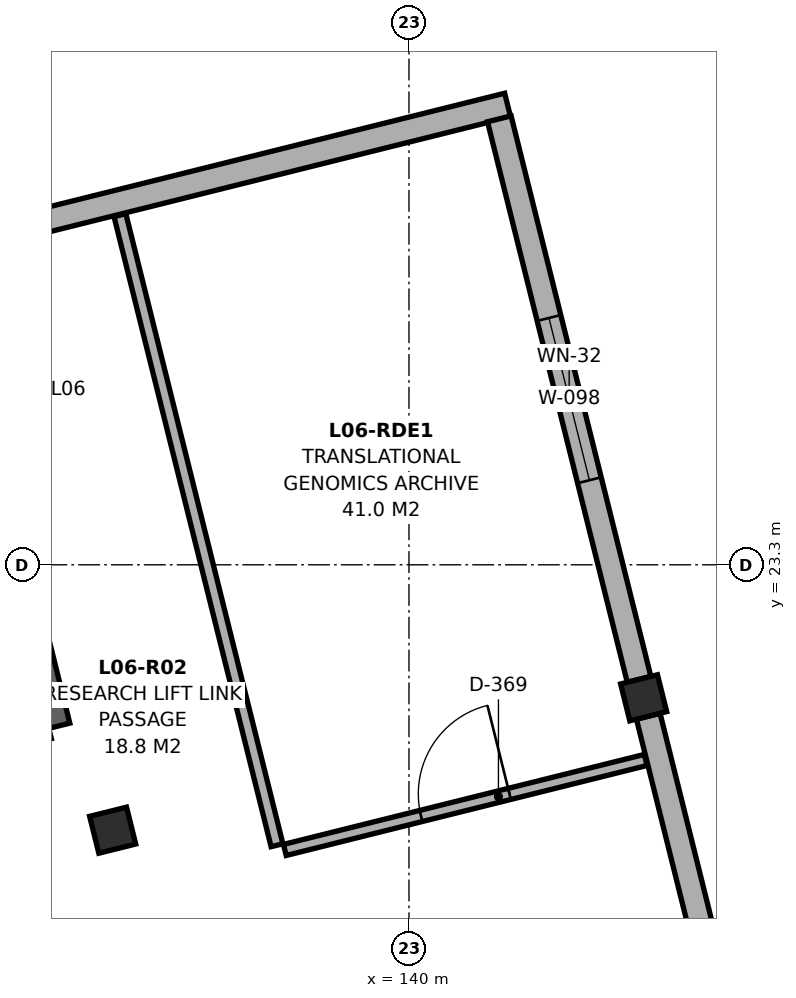
"""IFC4 building model, lengths in metres.
Left out: names, types, materials, properties, quantities, classifications, styles, units other than length and angle.
Written with IfcOpenShell. Run it as: python <this file> out.ifc"""

import sys

from ifc_helpers import new_model, si_unit, direction, frame, frame_2d, origin, origin_2d, place, context, subcontext, project, spatial, rectangle, extrude, element, fill, save


model = new_model("IFC4")
c1 = context("Model", 3, precision=1e-05, world=origin(), true_north=direction((0.0, 1.0)))
c2 = subcontext(c1, "Body", "Model", "MODEL_VIEW")
j1 = project(units=[si_unit("LENGTHUNIT", "METRE"), si_unit("PLANEANGLEUNIT", "RADIAN")], contexts=[c1])
p1 = place(None, origin())
s1 = spatial("IfcSite", under=j1, at=p1, CompositionType="ELEMENT")
p2 = place(p1, origin())
s2 = spatial("IfcBuilding", under=s1, at=p2, CompositionType="ELEMENT")
p3 = place(p2, frame((0.0, 0.0, 25.5)))
s3 = spatial("IfcBuildingStorey", under=s2, at=p3, CompositionType="ELEMENT", Elevation=25.5)
p4 = place(p3, frame((136.102, 19.808, 0.0), z_axis=(0.0, 0.0, 1.0), x_axis=(0.970295726276, 0.2419218956, 0.0)))
e1 = element("IfcColumn", 1, at=p4, inside=s3, PredefinedType="COLUMN", context=c2, shape_type="SweptSolid", body=[
    extrude(rectangle(XDim=0.5, YDim=0.5, at=origin_2d()), origin(), (0.0, 0.0, 1.0), 3.818),
])
p5 = place(p3, frame((143.088, 21.55, 0.0), z_axis=(0.0, 0.0, 1.0), x_axis=(0.970295726276, 0.2419218956, 0.0)))
e2 = element("IfcColumn", 2, at=p5, inside=s3, PredefinedType="COLUMN", context=c2, shape_type="SweptSolid", body=[
    extrude(rectangle(XDim=0.5, YDim=0.5, at=origin_2d()), origin(), (0.0, 0.0, 1.0), 4.738),
])
p6 = place(p3, frame((134.409, 27.631, 0.0), z_axis=(0.0, 0.0, 1.0), x_axis=(0.97030006528, 0.241904492141, 0.0)))
e3 = element("IfcWall", 3, at=p6, inside=s3, PredefinedType="SOLIDWALL", context=c2, shape_type="SweptSolid", body=[
    extrude(rectangle(XDim=7.1, YDim=0.32, at=frame_2d((3.55, 0.0))), origin(), (0.0, 0.0, 1.0), 3.7),
])
p7 = place(p3, frame((141.188, 29.167, 0.0), z_axis=(0.0, 0.0, 1.0), x_axis=(0.241923337436, -0.970295366785, 0.0)))
e4 = element("IfcWall", 4, at=p7, inside=s3, PredefinedType="SOLIDWALL", context=c2, shape_type="SweptSolid", body=[
    extrude(rectangle(XDim=7.6, YDim=0.32, at=frame_2d((3.8, 0.0))), origin(), (0.0, 0.0, 1.0), 3.7),
])
p8 = place(p7, frame((2.7, 0.0, 0.9)))
e5 = element("IfcOpeningElement", 5, at=p8, cuts=e4, PredefinedType="OPENING", context=c2, shape_type="SweptSolid", body=[
    extrude(rectangle(XDim=2.2, YDim=1.9, at=frame_2d((1.1, 0.95))), frame((0.0, 0.172, 0.0), z_axis=(0.0, -1.0, 0.0), x_axis=(1.0, 0.0, 0.0)), (0.0, 0.0, 1.0), 0.344),
])
p9 = place(p3, frame((143.148, 21.308, 0.0), z_axis=(0.0, 0.0, 1.0), x_axis=(0.241930483572, -0.970293585014, 0.0)))
e6 = element("IfcWall", 6, at=p9, inside=s3, PredefinedType="SOLIDWALL", context=c2, shape_type="SweptSolid", body=[
    extrude(rectangle(XDim=7.5, YDim=0.32, at=frame_2d((3.75, 0.0))), origin(), (0.0, 0.0, 1.0), 3.7),
])
p10 = place(p3, frame((135.402, 21.183, 0.0), z_axis=(0.0, 0.0, 1.0), x_axis=(-0.241921647353, 0.970295788171, 0.0)))
e7 = element("IfcWall", 7, at=p10, inside=s3, PredefinedType="SHEAR", context=c2, shape_type="SweptSolid", body=[
    extrude(rectangle(XDim=2.994, YDim=0.28, at=frame_2d((1.497, 0.0))), origin(), (0.0, 0.0, 1.0), 5.3),
])
p11 = place(p3, frame((138.367, 19.549, 0.0), z_axis=(0.0, 0.0, 1.0), x_axis=(0.970289077222, 0.241948561938, 0.0)))
e8 = element("IfcWall", 8, at=p11, inside=s3, PredefinedType="PARTITIONING", context=c2, shape_type="SweptSolid", body=[
    extrude(rectangle(XDim=4.893, YDim=0.15, at=frame_2d((2.446, 0.0))), origin(), (0.0, 0.0, 1.0), 3.7),
])
p12 = place(p11, frame((1.846, 0.0, 0.0)))
e9 = element("IfcOpeningElement", 9, at=p12, cuts=e8, PredefinedType="OPENING", context=c2, shape_type="SweptSolid", body=[
    extrude(rectangle(XDim=1.2, YDim=2.15, at=frame_2d((0.6, 1.075))), frame((0.0, 0.087, 0.0), z_axis=(0.0, -1.0, 0.0), x_axis=(1.0, 0.0, 0.0)), (0.0, 0.0, 1.0), 0.174),
])
p13 = place(p3, frame((138.264, 19.611, 0.0), z_axis=(0.0, 0.0, 1.0), x_axis=(-0.241937132378, 0.970291927193, 0.0)))
e10 = element("IfcWall", 10, at=p13, inside=s3, PredefinedType="PARTITIONING", context=c2, shape_type="SweptSolid", body=[
    extrude(rectangle(XDim=8.543, YDim=0.16, at=frame_2d((4.271, 0.0))), origin(), (0.0, 0.0, 1.0), 3.7),
])
p14 = place(p8, origin())
e11 = element("IfcWindow", 11, at=p14, inside=s3, PartitioningType="DOUBLE_PANEL_VERTICAL", PredefinedType="WINDOW", context=c2, shape_type="SweptSolid", body=[
    extrude(rectangle(XDim=2.2, YDim=1.9, at=frame_2d((1.1, 0.95))), frame((0.0, 0.03, 0.0), z_axis=(0.0, -1.0, 0.0), x_axis=(1.0, 0.0, 0.0)), (0.0, 0.0, 1.0), 0.06),
])
fill(e5, e11)
p15 = place(p12, origin())
e12 = element("IfcDoor", 12, at=p15, inside=s3, OperationType="SINGLE_SWING_RIGHT", PredefinedType="DOOR", context=c2, shape_type="SweptSolid", body=[
    extrude(rectangle(XDim=1.2, YDim=2.15, at=frame_2d((0.6, 1.075))), frame((0.0, 0.025, 0.0), z_axis=(0.0, -1.0, 0.0), x_axis=(1.0, 0.0, 0.0)), (0.0, 0.0, 1.0), 0.05),
])
fill(e9, e12)
save(model, sys.argv[1])
